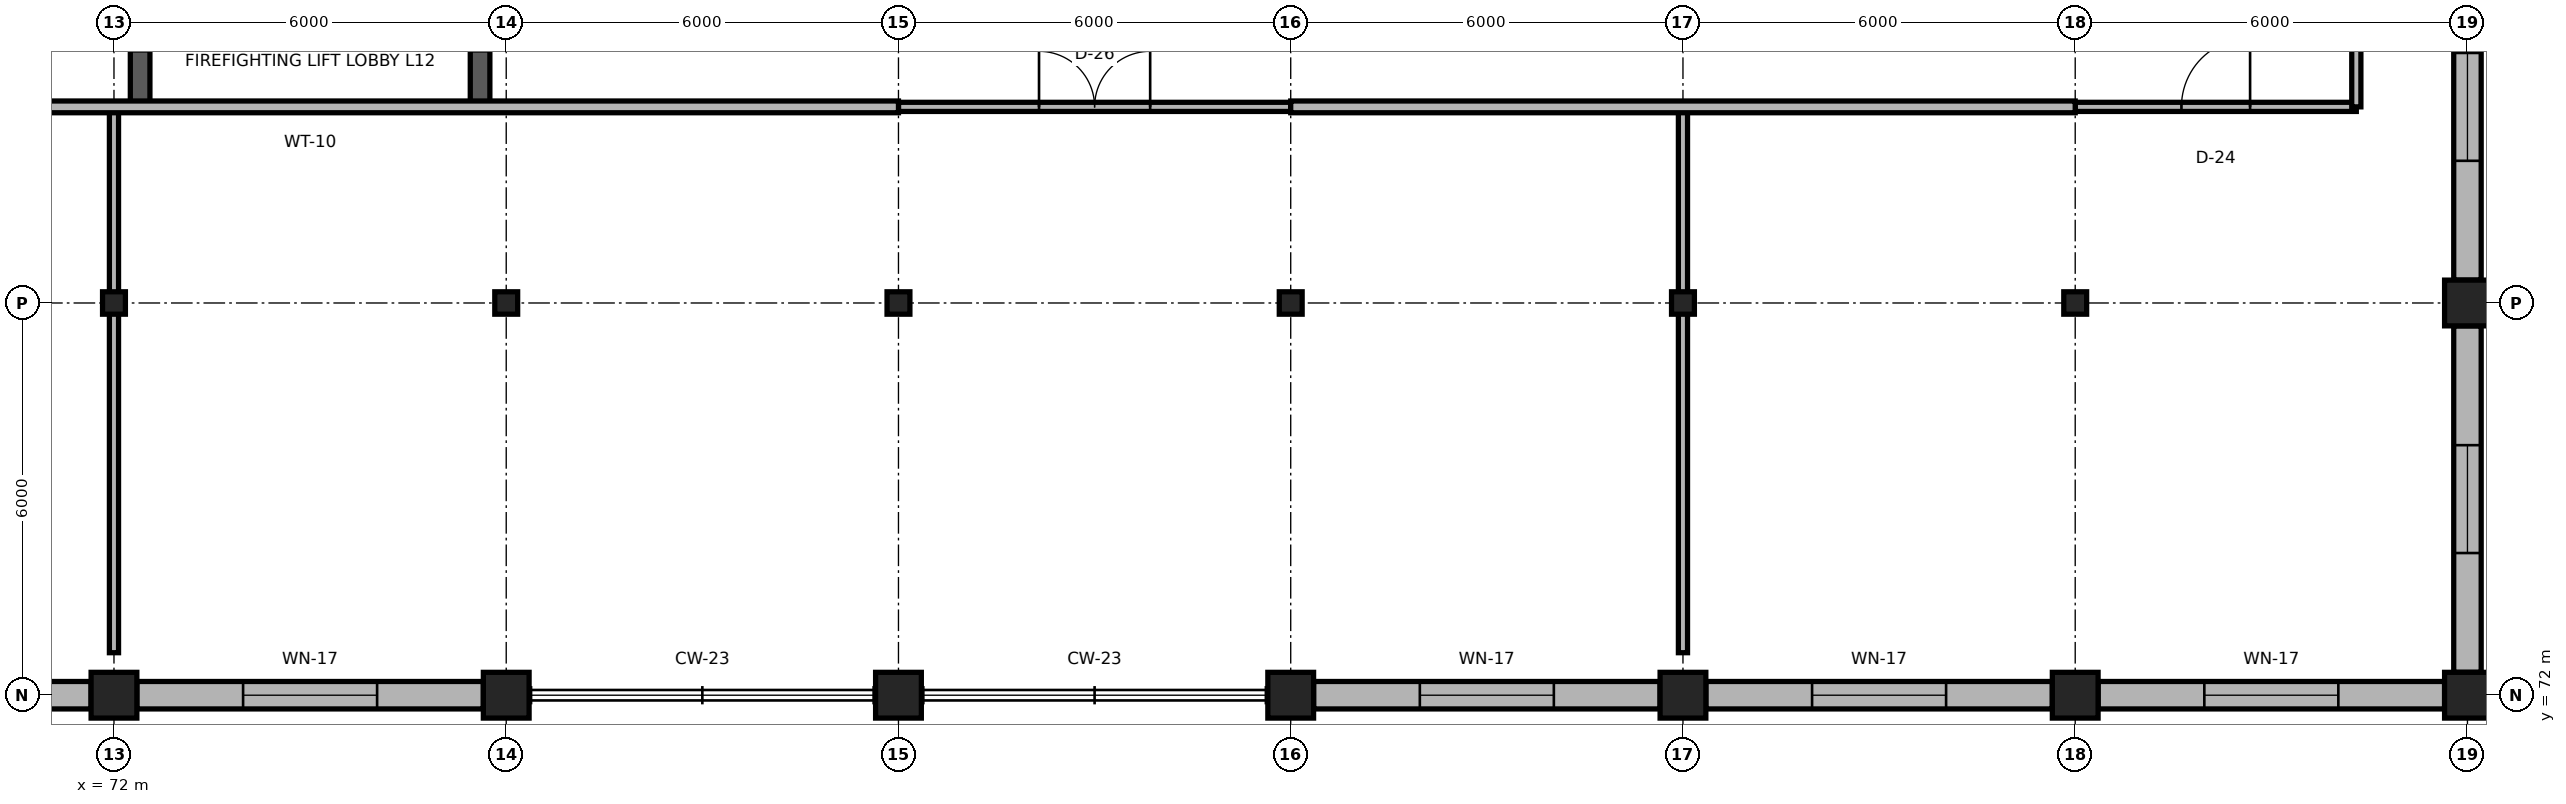
"""IFC4 building model, lengths in metres.
Left out: names, types, materials, properties, quantities, classifications, styles, units other than length and angle.
Written with IfcOpenShell. Run it as: python <this file> out.ifc"""

import sys

from ifc_helpers import new_model, si_unit, direction, frame, frame_2d, origin, origin_2d, place, context, subcontext, project, spatial, rectangle, i_section, extrude, element, fill, save


model = new_model("IFC4")
c1 = context("Model", 3, precision=1e-05, world=origin(), true_north=direction((0.0, 1.0)))
c2 = subcontext(c1, "Body", "Model", "MODEL_VIEW")
j1 = project(units=[si_unit("LENGTHUNIT", "METRE"), si_unit("PLANEANGLEUNIT", "RADIAN")], contexts=[c1])
p1 = place(None, origin())
s1 = spatial("IfcSite", under=j1, at=p1, CompositionType="ELEMENT")
p2 = place(p1, origin())
s2 = spatial("IfcBuilding", under=s1, at=p2, CompositionType="ELEMENT")
p3 = place(p2, frame((0.0, 0.0, 48.3)))
s3 = spatial("IfcBuildingStorey", under=s2, at=p3, CompositionType="ELEMENT", Elevation=48.3)
for number, where, z_axis, x_axis in (
    (1, (72.0, 72.0, 0.0), (0.0, 0.0, 1.0), (1.0, 0.0, 0.0)),
    (2, (78.0, 72.0, 0.0), (0.0, 0.0, 1.0), (1.0, 0.0, 0.0)),
    (3, (84.0, 72.0, 0.0), (0.0, 0.0, 1.0), (1.0, 0.0, 0.0)),
    (4, (90.0, 72.0, 0.0), (0.0, 0.0, 1.0), (1.0, 0.0, 0.0)),
    (5, (96.0, 72.0, 0.0), (0.0, 0.0, 1.0), (1.0, 0.0, 0.0)),
    (6, (102.0, 72.0, 0.0), (0.0, 0.0, 1.0), (1.0, 0.0, 0.0)),
    (7, (108.0, 72.0, 0.0), (0.0, 0.0, 1.0), (1.0, 0.0, 0.0)),
):
    element("IfcColumn", number, at=place(p3, frame(where, z_axis=z_axis, x_axis=x_axis)), inside=s3, PredefinedType="COLUMN", context=c2, shape_type="SweptSolid", body=[
        extrude(rectangle(XDim=0.7, YDim=0.7, at=origin_2d()), origin(), (0.0, 0.0, 1.0), 3.68),
    ])
for number, where, z_axis, x_axis in (
    (8, (72.0, 78.0, 0.0), (0.0, 0.0, 1.0), (1.0, 0.0, 0.0)),
    (9, (78.0, 78.0, 0.0), (0.0, 0.0, 1.0), (1.0, 0.0, 0.0)),
    (10, (84.0, 78.0, 0.0), (0.0, 0.0, 1.0), (1.0, 0.0, 0.0)),
    (11, (90.0, 78.0, 0.0), (0.0, 0.0, 1.0), (1.0, 0.0, 0.0)),
    (12, (96.0, 78.0, 0.0), (0.0, 0.0, 1.0), (1.0, 0.0, 0.0)),
    (13, (102.0, 78.0, 0.0), (0.0, 0.0, 1.0), (1.0, 0.0, 0.0)),
):
    element("IfcColumn", number, at=place(p3, frame(where, z_axis=z_axis, x_axis=x_axis)), inside=s3, PredefinedType="COLUMN", context=c2, shape_type="SweptSolid", body=[
        extrude(i_section(OverallWidth=0.35, OverallDepth=0.343, WebThickness=0.01, FlangeThickness=0.015, FilletRadius=0.02, at=origin_2d()), origin(), (0.0, 0.0, 1.0), 3.9),
    ])
p4 = place(p3, frame((108.0, 78.0, 0.0), z_axis=(0.0, 0.0, 1.0), x_axis=(1.0, 0.0, 0.0)))
e14 = element("IfcColumn", 14, at=p4, inside=s3, PredefinedType="COLUMN", context=c2, shape_type="SweptSolid", body=[
    extrude(rectangle(XDim=0.7, YDim=0.7, at=origin_2d()), origin(), (0.0, 0.0, 1.0), 3.9),
])
p5 = place(p3, frame((66.35, 72.0, 0.0), z_axis=(0.0, 0.0, 1.0), x_axis=(1.0, 0.0, 0.0)))
e15 = element("IfcWall", 15, at=p5, inside=s3, PredefinedType="SOLIDWALL", context=c2, shape_type="SweptSolid", body=[
    extrude(rectangle(XDim=5.3, YDim=0.42, at=frame_2d((2.65, 0.0))), origin(), (0.0, 0.0, 1.0), 3.26),
])
p6 = place(p5, frame((1.625, 0.0, 0.85)))
e16 = element("IfcOpeningElement", 16, at=p6, cuts=e15, PredefinedType="OPENING", context=c2, shape_type="SweptSolid", body=[
    extrude(rectangle(XDim=2.05, YDim=2.0, at=frame_2d((1.025, 1.0))), frame((0.0, 0.225, 0.0), z_axis=(0.0, -1.0, 0.0), x_axis=(1.0, 0.0, 0.0)), (0.0, 0.0, 1.0), 0.45),
])
p7 = place(p3, frame((72.35, 72.0, 0.0), z_axis=(0.0, 0.0, 1.0), x_axis=(1.0, 0.0, 0.0)))
e17 = element("IfcWall", 17, at=p7, inside=s3, PredefinedType="SOLIDWALL", context=c2, shape_type="SweptSolid", body=[
    extrude(rectangle(XDim=5.3, YDim=0.42, at=frame_2d((2.65, 0.0))), origin(), (0.0, 0.0, 1.0), 3.26),
])
p8 = place(p7, frame((1.625, 0.0, 0.85)))
e18 = element("IfcOpeningElement", 18, at=p8, cuts=e17, PredefinedType="OPENING", context=c2, shape_type="SweptSolid", body=[
    extrude(rectangle(XDim=2.05, YDim=2.0, at=frame_2d((1.025, 1.0))), frame((0.0, 0.225, 0.0), z_axis=(0.0, -1.0, 0.0), x_axis=(1.0, 0.0, 0.0)), (0.0, 0.0, 1.0), 0.45),
])
p9 = place(p3, frame((90.35, 72.0, 0.0), z_axis=(0.0, 0.0, 1.0), x_axis=(1.0, 0.0, 0.0)))
e19 = element("IfcWall", 19, at=p9, inside=s3, PredefinedType="SOLIDWALL", context=c2, shape_type="SweptSolid", body=[
    extrude(rectangle(XDim=5.3, YDim=0.42, at=frame_2d((2.65, 0.0))), origin(), (0.0, 0.0, 1.0), 3.26),
])
p10 = place(p9, frame((1.625, 0.0, 0.85)))
e20 = element("IfcOpeningElement", 20, at=p10, cuts=e19, PredefinedType="OPENING", context=c2, shape_type="SweptSolid", body=[
    extrude(rectangle(XDim=2.05, YDim=2.0, at=frame_2d((1.025, 1.0))), frame((0.0, 0.225, 0.0), z_axis=(0.0, -1.0, 0.0), x_axis=(1.0, 0.0, 0.0)), (0.0, 0.0, 1.0), 0.45),
])
p11 = place(p3, frame((96.35, 72.0, 0.0), z_axis=(0.0, 0.0, 1.0), x_axis=(1.0, 0.0, 0.0)))
e21 = element("IfcWall", 21, at=p11, inside=s3, PredefinedType="SOLIDWALL", context=c2, shape_type="SweptSolid", body=[
    extrude(rectangle(XDim=5.3, YDim=0.42, at=frame_2d((2.65, 0.0))), origin(), (0.0, 0.0, 1.0), 3.26),
])
p12 = place(p11, frame((1.625, 0.0, 0.85)))
e22 = element("IfcOpeningElement", 22, at=p12, cuts=e21, PredefinedType="OPENING", context=c2, shape_type="SweptSolid", body=[
    extrude(rectangle(XDim=2.05, YDim=2.0, at=frame_2d((1.025, 1.0))), frame((0.0, 0.225, 0.0), z_axis=(0.0, -1.0, 0.0), x_axis=(1.0, 0.0, 0.0)), (0.0, 0.0, 1.0), 0.45),
])
p13 = place(p3, frame((102.35, 72.0, 0.0), z_axis=(0.0, 0.0, 1.0), x_axis=(1.0, 0.0, 0.0)))
e23 = element("IfcWall", 23, at=p13, inside=s3, PredefinedType="SOLIDWALL", context=c2, shape_type="SweptSolid", body=[
    extrude(rectangle(XDim=5.3, YDim=0.42, at=frame_2d((2.65, 0.0))), origin(), (0.0, 0.0, 1.0), 3.26),
])
p14 = place(p13, frame((1.625, 0.0, 0.85)))
e24 = element("IfcOpeningElement", 24, at=p14, cuts=e23, PredefinedType="OPENING", context=c2, shape_type="SweptSolid", body=[
    extrude(rectangle(XDim=2.05, YDim=2.0, at=frame_2d((1.025, 1.0))), frame((0.0, 0.225, 0.0), z_axis=(0.0, -1.0, 0.0), x_axis=(1.0, 0.0, 0.0)), (0.0, 0.0, 1.0), 0.45),
])
p15 = place(p3, frame((108.0, 72.35, 0.0), z_axis=(0.0, 0.0, 1.0), x_axis=(0.0, 1.0, 0.0)))
e25 = element("IfcWall", 25, at=p15, inside=s3, PredefinedType="SOLIDWALL", context=c2, shape_type="SweptSolid", body=[
    extrude(rectangle(XDim=5.3, YDim=0.42, at=frame_2d((2.65, 0.0))), origin(), (0.0, 0.0, 1.0), 3.26),
])
p16 = place(p15, frame((1.825, 0.0, 0.85)))
e26 = element("IfcOpeningElement", 26, at=p16, cuts=e25, PredefinedType="OPENING", context=c2, shape_type="SweptSolid", body=[
    extrude(rectangle(XDim=1.65, YDim=1.95, at=frame_2d((0.825, 0.975))), frame((0.0, 0.225, 0.0), z_axis=(0.0, -1.0, 0.0), x_axis=(1.0, 0.0, 0.0)), (0.0, 0.0, 1.0), 0.45),
])
p17 = place(p3, frame((108.0, 78.35, 0.0), z_axis=(0.0, 0.0, 1.0), x_axis=(0.0, 1.0, 0.0)))
e27 = element("IfcWall", 27, at=p17, inside=s3, PredefinedType="SOLIDWALL", context=c2, shape_type="SweptSolid", body=[
    extrude(rectangle(XDim=5.3, YDim=0.42, at=frame_2d((2.65, 0.0))), origin(), (0.0, 0.0, 1.0), 3.26),
])
p18 = place(p17, frame((1.825, 0.0, 0.85)))
e28 = element("IfcOpeningElement", 28, at=p18, cuts=e27, PredefinedType="OPENING", context=c2, shape_type="SweptSolid", body=[
    extrude(rectangle(XDim=1.65, YDim=1.95, at=frame_2d((0.825, 0.975))), frame((0.0, 0.225, 0.0), z_axis=(0.0, -1.0, 0.0), x_axis=(1.0, 0.0, 0.0)), (0.0, 0.0, 1.0), 0.45),
])
p19 = place(p3, frame((72.4, 81.0, 0.0), z_axis=(0.0, 0.0, 1.0), x_axis=(0.0, 1.0, 0.0)))
e29 = element("IfcWall", 29, at=p19, inside=s3, PredefinedType="SHEAR", context=c2, shape_type="SweptSolid", body=[
    extrude(rectangle(XDim=3.0, YDim=0.3, at=frame_2d((1.5, 0.0))), origin(), (0.0, 0.0, 1.0), 3.68),
])
p20 = place(p19, frame((0.85, 0.0, 0.0)))
e30 = element("IfcOpeningElement", 30, at=p20, cuts=e29, PredefinedType="OPENING", context=c2, shape_type="SweptSolid", body=[
    extrude(rectangle(XDim=1.3, YDim=2.2, at=frame_2d((0.65, 1.1))), frame((0.0, 0.165, 0.0), z_axis=(0.0, -1.0, 0.0), x_axis=(1.0, 0.0, 0.0)), (0.0, 0.0, 1.0), 0.33),
])
p21 = place(p3, frame((77.6, 81.0, 0.0), z_axis=(0.0, 0.0, 1.0), x_axis=(0.0, 1.0, 0.0)))
e31 = element("IfcWall", 31, at=p21, inside=s3, PredefinedType="SHEAR", context=c2, shape_type="SweptSolid", body=[
    extrude(rectangle(XDim=3.0, YDim=0.3, at=frame_2d((1.5, 0.0))), origin(), (0.0, 0.0, 1.0), 3.68),
])
p22 = place(p21, frame((0.85, 0.0, 0.0)))
e32 = element("IfcOpeningElement", 32, at=p22, cuts=e31, PredefinedType="OPENING", context=c2, shape_type="SweptSolid", body=[
    extrude(rectangle(XDim=1.3, YDim=2.2, at=frame_2d((0.65, 1.1))), frame((0.0, 0.165, 0.0), z_axis=(0.0, -1.0, 0.0), x_axis=(1.0, 0.0, 0.0)), (0.0, 0.0, 1.0), 0.33),
])
p23 = place(p3, frame((84.0, 81.0, 0.0), z_axis=(0.0, 0.0, 1.0), x_axis=(1.0, 0.0, 0.0)))
e33 = element("IfcWall", 33, at=p23, inside=s3, PredefinedType="PARTITIONING", context=c2, shape_type="SweptSolid", body=[
    extrude(rectangle(XDim=6.0, YDim=0.14, at=frame_2d((3.0, 0.0))), origin(), (0.0, 0.0, 1.0), 3.68),
])
p24 = place(p23, frame((2.15, 0.0, 0.0)))
e34 = element("IfcOpeningElement", 34, at=p24, cuts=e33, PredefinedType="OPENING", context=c2, shape_type="SweptSolid", body=[
    extrude(rectangle(XDim=1.7, YDim=2.45, at=frame_2d((0.85, 1.225))), frame((0.0, 0.085, 0.0), z_axis=(0.0, -1.0, 0.0), x_axis=(1.0, 0.0, 0.0)), (0.0, 0.0, 1.0), 0.17),
])
p25 = place(p3, frame((102.0, 81.0, 0.0), z_axis=(0.0, 0.0, 1.0), x_axis=(1.0, 0.0, 0.0)))
e35 = element("IfcWall", 35, at=p25, inside=s3, PredefinedType="PARTITIONING", context=c2, shape_type="SweptSolid", body=[
    extrude(rectangle(XDim=4.3, YDim=0.14, at=frame_2d((2.15, 0.0))), origin(), (0.0, 0.0, 1.0), 3.68),
])
p26 = place(p25, frame((1.625, 0.0, 0.0)))
e36 = element("IfcOpeningElement", 36, at=p26, cuts=e35, PredefinedType="OPENING", context=c2, shape_type="SweptSolid", body=[
    extrude(rectangle(XDim=1.05, YDim=2.25, at=frame_2d((0.525, 1.125))), frame((0.0, 0.085, 0.0), z_axis=(0.0, -1.0, 0.0), x_axis=(1.0, 0.0, 0.0)), (0.0, 0.0, 1.0), 0.17),
])
for number, where, z_axis, x_axis in (
    (37, (72.0, 72.65, 0.0), (0.0, 0.0, 1.0), (0.0, 1.0, 0.0)),
    (38, (96.0, 72.65, 0.0), (0.0, 0.0, 1.0), (0.0, 1.0, 0.0)),
):
    element("IfcWall", number, at=place(p3, frame(where, z_axis=z_axis, x_axis=x_axis)), inside=s3, PredefinedType="PARTITIONING", context=c2, shape_type="SweptSolid", body=[
        extrude(rectangle(XDim=8.35, YDim=0.14, at=frame_2d((4.175, 0.0))), origin(), (0.0, 0.0, 1.0), 3.288),
    ])
p27 = place(p3, frame((66.0, 81.0, 0.0), z_axis=(0.0, 0.0, 1.0), x_axis=(1.0, 0.0, 0.0)))
e39 = element("IfcWall", 39, at=p27, inside=s3, PredefinedType="PARTITIONING", context=c2, shape_type="SweptSolid", body=[
    extrude(rectangle(XDim=18.0, YDim=0.18, at=frame_2d((9.0, 0.0))), origin(), (0.0, 0.0, 1.0), 3.68),
])
p28 = place(p3, frame((90.0, 81.0, 0.0), z_axis=(0.0, 0.0, 1.0), x_axis=(1.0, 0.0, 0.0)))
e40 = element("IfcWall", 40, at=p28, inside=s3, PredefinedType="PARTITIONING", context=c2, shape_type="SweptSolid", body=[
    extrude(rectangle(XDim=12.0, YDim=0.18, at=frame_2d((6.0, 0.0))), origin(), (0.0, 0.0, 1.0), 3.68),
])
p29 = place(p3, frame((106.3, 81.0, 0.0), z_axis=(0.0, 0.0, 1.0), x_axis=(0.0, 1.0, 0.0)))
e41 = element("IfcWall", 41, at=p29, inside=s3, PredefinedType="PARTITIONING", context=c2, shape_type="SweptSolid", body=[
    extrude(rectangle(XDim=1.15, YDim=0.14, at=frame_2d((0.575, 0.0))), origin(), (0.0, 0.0, 1.0), 3.68),
])
p30 = place(p8, origin())
e42 = element("IfcWindow", 42, at=p30, inside=s3, PartitioningType="SINGLE_PANEL", PredefinedType="WINDOW", context=c2, shape_type="SweptSolid", body=[
    extrude(rectangle(XDim=2.05, YDim=2.0, at=frame_2d((1.025, 1.0))), frame((0.0, 0.03, 0.0), z_axis=(0.0, -1.0, 0.0), x_axis=(1.0, 0.0, 0.0)), (0.0, 0.0, 1.0), 0.06),
])
fill(e18, e42)
p31 = place(p10, origin())
e43 = element("IfcWindow", 43, at=p31, inside=s3, PartitioningType="SINGLE_PANEL", PredefinedType="WINDOW", context=c2, shape_type="SweptSolid", body=[
    extrude(rectangle(XDim=2.05, YDim=2.0, at=frame_2d((1.025, 1.0))), frame((0.0, 0.03, 0.0), z_axis=(0.0, -1.0, 0.0), x_axis=(1.0, 0.0, 0.0)), (0.0, 0.0, 1.0), 0.06),
])
fill(e20, e43)
p32 = place(p12, origin())
e44 = element("IfcWindow", 44, at=p32, inside=s3, PartitioningType="SINGLE_PANEL", PredefinedType="WINDOW", context=c2, shape_type="SweptSolid", body=[
    extrude(rectangle(XDim=2.05, YDim=2.0, at=frame_2d((1.025, 1.0))), frame((0.0, 0.03, 0.0), z_axis=(0.0, -1.0, 0.0), x_axis=(1.0, 0.0, 0.0)), (0.0, 0.0, 1.0), 0.06),
])
fill(e22, e44)
p33 = place(p14, origin())
e45 = element("IfcWindow", 45, at=p33, inside=s3, PartitioningType="SINGLE_PANEL", PredefinedType="WINDOW", context=c2, shape_type="SweptSolid", body=[
    extrude(rectangle(XDim=2.05, YDim=2.0, at=frame_2d((1.025, 1.0))), frame((0.0, 0.03, 0.0), z_axis=(0.0, -1.0, 0.0), x_axis=(1.0, 0.0, 0.0)), (0.0, 0.0, 1.0), 0.06),
])
fill(e24, e45)
p34 = place(p16, origin())
e46 = element("IfcWindow", 46, at=p34, inside=s3, PartitioningType="SINGLE_PANEL", PredefinedType="WINDOW", context=c2, shape_type="SweptSolid", body=[
    extrude(rectangle(XDim=1.65, YDim=1.95, at=frame_2d((0.825, 0.975))), frame((0.0, 0.03, 0.0), z_axis=(0.0, -1.0, 0.0), x_axis=(1.0, 0.0, 0.0)), (0.0, 0.0, 1.0), 0.06),
])
fill(e26, e46)
p35 = place(p18, origin())
e47 = element("IfcWindow", 47, at=p35, inside=s3, PartitioningType="SINGLE_PANEL", PredefinedType="WINDOW", context=c2, shape_type="SweptSolid", body=[
    extrude(rectangle(XDim=1.65, YDim=1.95, at=frame_2d((0.825, 0.975))), frame((0.0, 0.03, 0.0), z_axis=(0.0, -1.0, 0.0), x_axis=(1.0, 0.0, 0.0)), (0.0, 0.0, 1.0), 0.06),
])
fill(e28, e47)
p36 = place(p24, origin())
e48 = element("IfcDoor", 48, at=p36, inside=s3, OperationType="DOUBLE_DOOR_SINGLE_SWING", PredefinedType="DOOR", context=c2, shape_type="SweptSolid", body=[
    extrude(rectangle(XDim=1.7, YDim=2.45, at=frame_2d((0.85, 1.225))), frame((0.0, 0.025, 0.0), z_axis=(0.0, -1.0, 0.0), x_axis=(1.0, 0.0, 0.0)), (0.0, 0.0, 1.0), 0.05),
])
fill(e34, e48)
p37 = place(p26, origin())
e49 = element("IfcDoor", 49, at=p37, inside=s3, OperationType="SINGLE_SWING_RIGHT", PredefinedType="DOOR", context=c2, shape_type="SweptSolid", body=[
    extrude(rectangle(XDim=1.05, YDim=2.25, at=frame_2d((0.525, 1.125))), frame((0.0, 0.025, 0.0), z_axis=(0.0, -1.0, 0.0), x_axis=(1.0, 0.0, 0.0)), (0.0, 0.0, 1.0), 0.05),
])
fill(e36, e49)
save(model, sys.argv[1])
